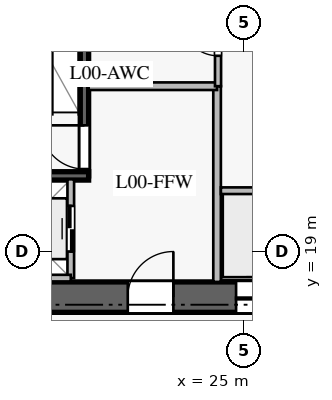
"""IFC4 building model, lengths in metres.
Left out: names, types, materials, properties, quantities, classifications, styles, units other than length and angle.
Written with IfcOpenShell. Run it as: python <this file> out.ifc"""

import sys

from ifc_helpers import new_model, si_unit, direction, frame, frame_2d, origin, place, context, subcontext, project, spatial, rectangle, extrude, element, fill, save


model = new_model("IFC4")
c1 = context("Model", 3, precision=1e-05, world=origin(), true_north=direction((0.0, 1.0)))
c2 = subcontext(c1, "Body", "Model", "MODEL_VIEW")
j1 = project(units=[si_unit("LENGTHUNIT", "METRE"), si_unit("PLANEANGLEUNIT", "RADIAN")], contexts=[c1])
p1 = place(None, origin())
s1 = spatial("IfcSite", under=j1, at=p1, CompositionType="ELEMENT")
p2 = place(p1, origin())
s2 = spatial("IfcBuilding", under=s1, at=p2, CompositionType="ELEMENT")
p3 = place(p2, origin())
s3 = spatial("IfcBuildingStorey", under=s2, at=p3, CompositionType="ELEMENT", Elevation=0.0)
p4 = place(p3, frame((16.8, 17.8, 0.0), z_axis=(0.0, 0.0, 1.0), x_axis=(1.0, 0.0, 0.0)))
e1 = element("IfcWall", 1, at=p4, inside=s3, PredefinedType="SHEAR", context=c2, shape_type="SweptSolid", body=[
    extrude(rectangle(XDim=16.4, YDim=0.8, at=frame_2d((8.2, 0.0))), origin(), (0.0, 0.0, 1.0), 4.94),
])
p5 = place(p4, frame((5.15, 0.0, 0.0)))
e2 = element("IfcOpeningElement", 2, at=p5, cuts=e1, PredefinedType="OPENING", context=c2, shape_type="SweptSolid", body=[
    extrude(rectangle(XDim=1.2, YDim=2.25, at=frame_2d((0.6, 1.125))), frame((0.0, 0.41, 0.0), z_axis=(0.0, -1.0, 0.0), x_axis=(1.0, 0.0, 0.0)), (0.0, 0.0, 1.0), 0.82),
])
p6 = place(p4, frame((14.1, 0.0, 0.0)))
e3 = element("IfcOpeningElement", 3, at=p6, cuts=e1, PredefinedType="OPENING", context=c2, shape_type="SweptSolid", body=[
    extrude(rectangle(XDim=0.9, YDim=2.1, at=frame_2d((0.45, 1.05))), frame((0.0, 0.41, 0.0), z_axis=(0.0, -1.0, 0.0), x_axis=(1.0, 0.0, 0.0)), (0.0, 0.0, 1.0), 0.82),
])
p7 = place(p4, frame((8.0, 0.0, 0.0)))
e4 = element("IfcOpeningElement", 4, at=p7, cuts=e1, PredefinedType="OPENING", context=c2, shape_type="SweptSolid", body=[
    extrude(rectangle(XDim=1.1, YDim=2.2, at=frame_2d((0.55, 1.1))), frame((0.0, 0.41, 0.0), z_axis=(0.0, -1.0, 0.0), x_axis=(1.0, 0.0, 0.0)), (0.0, 0.0, 1.0), 0.82),
])
p8 = place(p4, frame((9.975, 0.0, 0.0)))
e5 = element("IfcOpeningElement", 5, at=p8, cuts=e1, PredefinedType="OPENING", context=c2, shape_type="SweptSolid", body=[
    extrude(rectangle(XDim=1.1, YDim=2.2, at=frame_2d((0.55, 1.1))), frame((0.0, 0.41, 0.0), z_axis=(0.0, -1.0, 0.0), x_axis=(1.0, 0.0, 0.0)), (0.0, 0.0, 1.0), 0.82),
])
p9 = place(p4, frame((11.95, 0.0, 0.0)))
e6 = element("IfcOpeningElement", 6, at=p9, cuts=e1, PredefinedType="OPENING", context=c2, shape_type="SweptSolid", body=[
    extrude(rectangle(XDim=1.1, YDim=2.2, at=frame_2d((0.55, 1.1))), frame((0.0, 0.41, 0.0), z_axis=(0.0, -1.0, 0.0), x_axis=(1.0, 0.0, 0.0)), (0.0, 0.0, 1.0), 0.82),
])
p10 = place(p3, frame((20.81, 20.99, 0.0), z_axis=(0.0, 0.0, 1.0), x_axis=(0.0, 1.0, 0.0)))
e7 = element("IfcWall", 7, at=p10, inside=s3, PredefinedType="SOLIDWALL", context=c2, shape_type="SweptSolid", body=[
    extrude(rectangle(XDim=7.22, YDim=0.22, at=frame_2d((3.61, 0.0))), origin(), (0.0, 0.0, 1.0), 4.94),
])
p11 = place(p10, frame((0.18, 0.0, 0.0)))
e8 = element("IfcOpeningElement", 8, at=p11, cuts=e7, PredefinedType="OPENING", context=c2, shape_type="SweptSolid", body=[
    extrude(rectangle(XDim=1.15, YDim=2.2, at=frame_2d((0.575, 1.1))), frame((0.0, 0.12, 0.0), z_axis=(0.0, -1.0, 0.0), x_axis=(1.0, 0.0, 0.0)), (0.0, 0.0, 1.0), 0.24),
])
p12 = place(p3, frame((17.2, 20.99, 0.0), z_axis=(0.0, 0.0, 1.0), x_axis=(1.0, 0.0, 0.0)))
e9 = element("IfcWall", 9, at=p12, inside=s3, PredefinedType="SOLIDWALL", context=c2, shape_type="SweptSolid", body=[
    extrude(rectangle(XDim=3.72, YDim=0.22, at=frame_2d((1.86, 0.0))), origin(), (0.0, 0.0, 1.0), 4.94),
])
p13 = place(p3, frame((24.3, 18.2, 0.0), z_axis=(0.0, 0.0, 1.0), x_axis=(0.0, 1.0, 0.0)))
e10 = element("IfcWall", 10, at=p13, inside=s3, PredefinedType="PARTITIONING", context=c2, shape_type="SweptSolid", body=[
    extrude(rectangle(XDim=5.15, YDim=0.2, at=frame_2d((2.575, 0.0))), origin(), (0.0, 0.0, 1.0), 4.94),
])
p14 = place(p3, frame((20.92, 23.35, 0.0), z_axis=(0.0, 0.0, 1.0), x_axis=(1.0, 0.0, 0.0)))
e11 = element("IfcWall", 11, at=p14, inside=s3, PredefinedType="PARTITIONING", context=c2, shape_type="SweptSolid", body=[
    extrude(rectangle(XDim=3.38, YDim=0.2, at=frame_2d((1.69, 0.0))), origin(), (0.0, 0.0, 1.0), 4.94),
])
p15 = place(p3, frame((24.325, 23.35, 0.0), z_axis=(0.0, 0.0, 1.0), x_axis=(0.0, 1.0, 0.0)))
e12 = element("IfcWall", 12, at=p15, inside=s3, PredefinedType="PLUMBINGWALL", context=c2, shape_type="SweptSolid", body=[
    extrude(rectangle(XDim=4.93, YDim=0.16, at=frame_2d((2.465, 0.0))), origin(), (0.0, 0.0, 1.0), 4.94),
])
p16 = place(p15, frame((0.8, 0.0, 0.0)))
e13 = element("IfcOpeningElement", 13, at=p16, cuts=e12, PredefinedType="OPENING", context=c2, shape_type="SweptSolid", body=[
    extrude(rectangle(XDim=0.95, YDim=2.1, at=frame_2d((0.475, 1.05))), frame((0.0, 0.09, 0.0), z_axis=(0.0, -1.0, 0.0), x_axis=(1.0, 0.0, 0.0)), (0.0, 0.0, 1.0), 0.18),
])
p17 = place(p15, frame((3.26, 0.0, 0.0)))
e14 = element("IfcOpeningElement", 14, at=p17, cuts=e12, PredefinedType="OPENING", context=c2, shape_type="SweptSolid", body=[
    extrude(rectangle(XDim=0.9, YDim=2.1, at=frame_2d((0.45, 1.05))), frame((0.0, 0.09, 0.0), z_axis=(0.0, -1.0, 0.0), x_axis=(1.0, 0.0, 0.0)), (0.0, 0.0, 1.0), 0.18),
])
p18 = place(p3, frame((24.4, 20.6, 0.0), z_axis=(0.0, 0.0, 1.0), x_axis=(1.0, 0.0, 0.0)))
e15 = element("IfcWall", 15, at=p18, inside=s3, PredefinedType="PARTITIONING", context=c2, shape_type="SweptSolid", body=[
    extrude(rectangle(XDim=1.9, YDim=0.175, at=frame_2d((0.95, 0.0))), origin(), (0.0, 0.0, 1.0), 4.94),
])
p19 = place(p3, frame((20.45, 18.3, 0.0), z_axis=(0.0, 0.0, 1.0), x_axis=(0.0, 1.0, 0.0)))
e16 = element("IfcWall", 16, at=p19, inside=s3, PredefinedType="PARTITIONING", context=c2, shape_type="SweptSolid", body=[
    extrude(rectangle(XDim=2.6, YDim=0.175, at=frame_2d((1.3, 0.0))), origin(), (0.0, 0.0, 1.0), 4.94),
])
p20 = place(p19, frame((0.7, 0.0, 0.0)))
e17 = element("IfcOpeningElement", 17, at=p20, cuts=e16, PredefinedType="OPENING", context=c2, shape_type="SweptSolid", body=[
    extrude(rectangle(XDim=1.2, YDim=2.2, at=frame_2d((0.6, 1.1))), frame((0.0, 0.098, 0.0), z_axis=(0.0, -1.0, 0.0), x_axis=(1.0, 0.0, 0.0)), (0.0, 0.0, 1.0), 0.195),
])
p21 = place(p3, frame((17.85, 18.3, 0.0), z_axis=(0.0, 0.0, 1.0), x_axis=(1.0, 0.0, 0.0)))
e18 = element("IfcWall", 18, at=p21, inside=s3, PredefinedType="PARTITIONING", context=c2, shape_type="SweptSolid", body=[
    extrude(rectangle(XDim=2.6, YDim=0.175, at=frame_2d((1.3, 0.0))), origin(), (0.0, 0.0, 1.0), 4.94),
])
p22 = place(p11, origin())
e19 = element("IfcDoor", 19, at=p22, inside=s3, OperationType="SINGLE_SWING_RIGHT", PredefinedType="DOOR", context=c2, shape_type="SweptSolid", body=[
    extrude(rectangle(XDim=1.15, YDim=2.2, at=frame_2d((0.575, 1.1))), frame((0.0, 0.025, 0.0), z_axis=(0.0, -1.0, 0.0), x_axis=(1.0, 0.0, 0.0)), (0.0, 0.0, 1.0), 0.05),
])
fill(e8, e19)
p23 = place(p5, origin())
e20 = element("IfcDoor", 20, at=p23, inside=s3, OperationType="SINGLE_SWING_RIGHT", PredefinedType="DOOR", context=c2, shape_type="SweptSolid", body=[
    extrude(rectangle(XDim=1.2, YDim=2.25, at=frame_2d((0.6, 1.125))), frame((0.0, 0.025, 0.0), z_axis=(0.0, -1.0, 0.0), x_axis=(1.0, 0.0, 0.0)), (0.0, 0.0, 1.0), 0.05),
])
fill(e2, e20)
p24 = place(p16, origin())
e21 = element("IfcDoor", 21, at=p24, inside=s3, OperationType="SINGLE_SWING_RIGHT", PredefinedType="DOOR", context=c2, shape_type="SweptSolid", body=[
    extrude(rectangle(XDim=0.95, YDim=2.1, at=frame_2d((0.475, 1.05))), frame((0.0, 0.025, 0.0), z_axis=(0.0, -1.0, 0.0), x_axis=(1.0, 0.0, 0.0)), (0.0, 0.0, 1.0), 0.05),
])
fill(e13, e21)
p25 = place(p7, origin())
e22 = element("IfcDoor", 22, at=p25, inside=s3, OperationType="DOUBLE_DOOR_SLIDING", PredefinedType="DOOR", context=c2, shape_type="SweptSolid", body=[
    extrude(rectangle(XDim=1.1, YDim=2.2, at=frame_2d((0.55, 1.1))), frame((0.0, 0.025, 0.0), z_axis=(0.0, -1.0, 0.0), x_axis=(1.0, 0.0, 0.0)), (0.0, 0.0, 1.0), 0.05),
])
fill(e4, e22)
p26 = place(p20, origin())
e23 = element("IfcDoor", 23, at=p26, inside=s3, OperationType="DOUBLE_DOOR_SLIDING", PredefinedType="DOOR", context=c2, shape_type="SweptSolid", body=[
    extrude(rectangle(XDim=1.2, YDim=2.2, at=frame_2d((0.6, 1.1))), frame((0.0, 0.025, 0.0), z_axis=(0.0, -1.0, 0.0), x_axis=(1.0, 0.0, 0.0)), (0.0, 0.0, 1.0), 0.05),
])
fill(e17, e23)
save(model, sys.argv[1])
